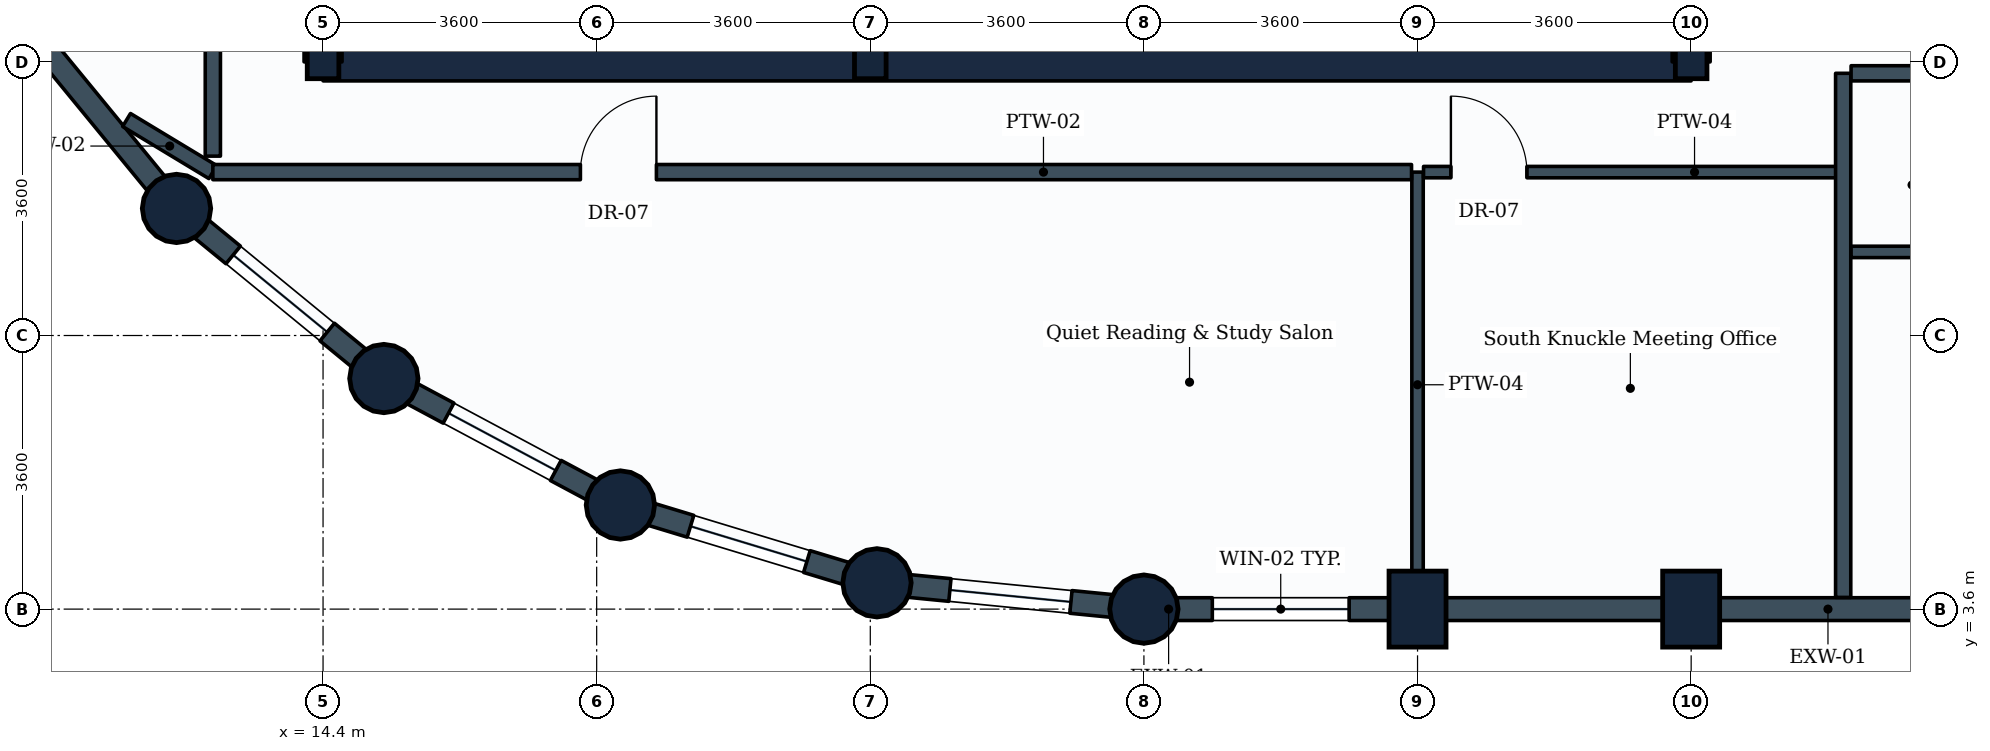
"""IFC4 building model, lengths in metres.
Left out: names, types, materials, properties, quantities, classifications, styles, units other than length and angle.
Written with IfcOpenShell. Run it as: python <this file> out.ifc"""

import sys

from ifc_helpers import new_model, si_unit, direction, frame, frame_2d, origin, origin_2d, place, context, subcontext, project, spatial, rectangle, circle, i_section, extrude, element, fill, save


model = new_model("IFC4")
c1 = context("Model", 3, precision=1e-05, world=origin(), true_north=direction((0.0, 1.0)))
c2 = subcontext(c1, "Body", "Model", "MODEL_VIEW")
j1 = project(units=[si_unit("LENGTHUNIT", "METRE"), si_unit("PLANEANGLEUNIT", "RADIAN")], contexts=[c1])
p1 = place(None, origin())
s1 = spatial("IfcSite", under=j1, at=p1, CompositionType="ELEMENT")
p2 = place(p1, origin())
s2 = spatial("IfcBuilding", under=s1, at=p2, CompositionType="ELEMENT")
p3 = place(p2, frame((0.0, 0.0, 127.6)))
s3 = spatial("IfcBuildingStorey", under=s2, at=p3, CompositionType="ELEMENT", Elevation=127.6)
p4 = place(p3, frame((12.472, 8.872, 0.0), z_axis=(0.0, 0.0, 1.0), x_axis=(1.0, 0.0, 0.0)))
e1 = element("IfcColumn", 1, at=p4, inside=s3, PredefinedType="COLUMN", context=c2, shape_type="SweptSolid", body=[
    extrude(circle(Radius=0.45, at=origin_2d()), origin(), (0.0, 0.0, 1.0), 3.8),
])
p5 = place(p3, frame((14.4, 10.8, 0.0), z_axis=(0.0, 0.0, 1.0), x_axis=(1.0, 0.0, 0.0)))
e2 = element("IfcColumn", 2, at=p5, inside=s3, PredefinedType="COLUMN", context=c2, shape_type="SweptSolid", body=[
    extrude(i_section(OverallWidth=0.416, OverallDepth=0.442, WebThickness=0.025, FlangeThickness=0.041, FilletRadius=0.015, at=origin_2d()), origin(), (0.0, 0.0, 1.0), 3.8),
])
for number, where, z_axis, x_axis in (
    (3, (15.2, 6.634, 0.0), (0.0, 0.0, 1.0), (1.0, 0.0, 0.0)),
    (4, (18.312, 4.97, 0.0), (0.0, 0.0, 1.0), (1.0, 0.0, 0.0)),
):
    element("IfcColumn", number, at=place(p3, frame(where, z_axis=z_axis, x_axis=x_axis)), inside=s3, PredefinedType="COLUMN", context=c2, shape_type="SweptSolid", body=[
        extrude(circle(Radius=0.45, at=origin_2d()), origin(), (0.0, 0.0, 1.0), 3.8),
    ])
p6 = place(p3, frame((21.6, 10.8, 0.0), z_axis=(0.0, 0.0, 1.0), x_axis=(1.0, 0.0, 0.0)))
e5 = element("IfcColumn", 5, at=p6, inside=s3, PredefinedType="COLUMN", context=c2, shape_type="SweptSolid", body=[
    extrude(i_section(OverallWidth=0.416, OverallDepth=0.442, WebThickness=0.025, FlangeThickness=0.041, FilletRadius=0.015, at=origin_2d()), origin(), (0.0, 0.0, 1.0), 3.8),
])
for number, where, z_axis, x_axis in (
    (6, (21.688, 3.946, 0.0), (0.0, 0.0, 1.0), (1.0, 0.0, 0.0)),
    (7, (25.2, 3.6, 0.0), (0.0, 0.0, 1.0), (1.0, 0.0, 0.0)),
):
    element("IfcColumn", number, at=place(p3, frame(where, z_axis=z_axis, x_axis=x_axis)), inside=s3, PredefinedType="COLUMN", context=c2, shape_type="SweptSolid", body=[
        extrude(circle(Radius=0.45, at=origin_2d()), origin(), (0.0, 0.0, 1.0), 3.8),
    ])
for number, where, z_axis, x_axis in (
    (8, (28.8, 3.6, 0.0), (0.0, 0.0, 1.0), (1.0, 0.0, 0.0)),
    (9, (32.4, 3.6, 0.0), (0.0, 0.0, 1.0), (1.0, 0.0, 0.0)),
):
    element("IfcColumn", number, at=place(p3, frame(where, z_axis=z_axis, x_axis=x_axis)), inside=s3, PredefinedType="COLUMN", context=c2, shape_type="SweptSolid", body=[
        extrude(rectangle(XDim=0.75, YDim=1.0, at=origin_2d()), origin(), (0.0, 0.0, 1.0), 3.8),
    ])
p7 = place(p3, frame((32.4, 10.8, 0.0), z_axis=(0.0, 0.0, 1.0), x_axis=(1.0, 0.0, 0.0)))
e10 = element("IfcColumn", 10, at=p7, inside=s3, PredefinedType="COLUMN", context=c2, shape_type="SweptSolid", body=[
    extrude(i_section(OverallWidth=0.416, OverallDepth=0.442, WebThickness=0.025, FlangeThickness=0.041, FilletRadius=0.015, at=origin_2d()), origin(), (0.0, 0.0, 1.0), 3.8),
])
p8 = place(p3, frame((28.8, 3.6, 0.0), z_axis=(0.0, 0.0, 1.0), x_axis=(-1.0, 0.0, 0.0)))
e11 = element("IfcWall", 11, at=p8, inside=s3, PredefinedType="STANDARD", context=c2, shape_type="SweptSolid", body=[
    extrude(rectangle(XDim=3.6, YDim=0.3, at=frame_2d((1.8, 0.0))), origin(), (0.0, 0.0, 1.0), 2.93),
])
p9 = place(p8, frame((0.9, 0.0, 0.85)))
e12 = element("IfcOpeningElement", 12, at=p9, cuts=e11, PredefinedType="OPENING", context=c2, shape_type="SweptSolid", body=[
    extrude(rectangle(XDim=1.8, YDim=1.35, at=frame_2d((0.9, 0.675))), frame((0.0, 0.16, 0.0), z_axis=(0.0, -1.0, 0.0), x_axis=(1.0, 0.0, 0.0)), (0.0, 0.0, 1.0), 0.32),
])
p10 = place(p3, frame((32.4, 3.6, 0.0), z_axis=(0.0, 0.0, 1.0), x_axis=(-1.0, 0.0, 0.0)))
e13 = element("IfcWall", 13, at=p10, inside=s3, PredefinedType="STANDARD", context=c2, shape_type="SweptSolid", body=[
    extrude(rectangle(XDim=3.6, YDim=0.3, at=frame_2d((1.8, 0.0))), origin(), (0.0, 0.0, 1.0), 2.93),
])
p11 = place(p3, frame((36.0, 3.6, 0.0), z_axis=(0.0, 0.0, 1.0), x_axis=(-1.0, 0.0, 0.0)))
e14 = element("IfcWall", 14, at=p11, inside=s3, PredefinedType="STANDARD", context=c2, shape_type="SweptSolid", body=[
    extrude(rectangle(XDim=3.6, YDim=0.3, at=frame_2d((1.8, 0.0))), origin(), (0.0, 0.0, 1.0), 2.93),
])
p12 = place(p3, frame((12.472, 8.872, 0.0), z_axis=(0.0, 0.0, 1.0), x_axis=(-0.634258295121, 0.773121216285, 0.0)))
e15 = element("IfcWall", 15, at=p12, inside=s3, PredefinedType="STANDARD", context=c2, shape_type="SweptSolid", body=[
    extrude(rectangle(XDim=3.529, YDim=0.3, at=frame_2d((1.764, 0.0))), origin(), (0.0, 0.0, 1.0), 2.93),
])
p13 = place(p3, frame((15.2, 6.634, 0.0), z_axis=(0.0, 0.0, 1.0), x_axis=(-0.773121216285, 0.634258295121, 0.0)))
e16 = element("IfcWall", 16, at=p13, inside=s3, PredefinedType="STANDARD", context=c2, shape_type="SweptSolid", body=[
    extrude(rectangle(XDim=3.529, YDim=0.3, at=frame_2d((1.764, 0.0))), origin(), (0.0, 0.0, 1.0), 2.93),
])
p14 = place(p13, frame((0.964, 0.0, 0.85)))
e17 = element("IfcOpeningElement", 17, at=p14, cuts=e16, PredefinedType="OPENING", context=c2, shape_type="SweptSolid", body=[
    extrude(rectangle(XDim=1.6, YDim=1.35, at=frame_2d((0.8, 0.675))), frame((0.0, 0.16, 0.0), z_axis=(0.0, -1.0, 0.0), x_axis=(1.0, 0.0, 0.0)), (0.0, 0.0, 1.0), 0.32),
])
p15 = place(p3, frame((18.312, 4.97, 0.0), z_axis=(0.0, 0.0, 1.0), x_axis=(-0.881846862014, 0.471535907389, 0.0)))
e18 = element("IfcWall", 18, at=p15, inside=s3, PredefinedType="STANDARD", context=c2, shape_type="SweptSolid", body=[
    extrude(rectangle(XDim=3.529, YDim=0.3, at=frame_2d((1.765, 0.0))), origin(), (0.0, 0.0, 1.0), 2.93),
])
p16 = place(p15, frame((0.964, 0.0, 0.85)))
e19 = element("IfcOpeningElement", 19, at=p16, cuts=e18, PredefinedType="OPENING", context=c2, shape_type="SweptSolid", body=[
    extrude(rectangle(XDim=1.6, YDim=1.35, at=frame_2d((0.8, 0.675))), frame((0.0, 0.16, 0.0), z_axis=(0.0, -1.0, 0.0), x_axis=(1.0, 0.0, 0.0)), (0.0, 0.0, 1.0), 0.32),
])
p17 = place(p3, frame((21.688, 3.946, 0.0), z_axis=(0.0, 0.0, 1.0), x_axis=(-0.956953367403, 0.290241714123, 0.0)))
e20 = element("IfcWall", 20, at=p17, inside=s3, PredefinedType="STANDARD", context=c2, shape_type="SweptSolid", body=[
    extrude(rectangle(XDim=3.528, YDim=0.3, at=frame_2d((1.764, 0.0))), origin(), (0.0, 0.0, 1.0), 2.93),
])
p18 = place(p17, frame((0.964, 0.0, 0.85)))
e21 = element("IfcOpeningElement", 21, at=p18, cuts=e20, PredefinedType="OPENING", context=c2, shape_type="SweptSolid", body=[
    extrude(rectangle(XDim=1.6, YDim=1.35, at=frame_2d((0.8, 0.675))), frame((0.0, 0.16, 0.0), z_axis=(0.0, -1.0, 0.0), x_axis=(1.0, 0.0, 0.0)), (0.0, 0.0, 1.0), 0.32),
])
p19 = place(p3, frame((25.2, 3.6, 0.0), z_axis=(0.0, 0.0, 1.0), x_axis=(-0.995183369056, 0.098030923459, 0.0)))
e22 = element("IfcWall", 22, at=p19, inside=s3, PredefinedType="STANDARD", context=c2, shape_type="SweptSolid", body=[
    extrude(rectangle(XDim=3.529, YDim=0.3, at=frame_2d((1.765, 0.0))), origin(), (0.0, 0.0, 1.0), 2.93),
])
p20 = place(p19, frame((0.965, 0.0, 0.85)))
e23 = element("IfcOpeningElement", 23, at=p20, cuts=e22, PredefinedType="OPENING", context=c2, shape_type="SweptSolid", body=[
    extrude(rectangle(XDim=1.6, YDim=1.35, at=frame_2d((0.8, 0.675))), frame((0.0, 0.16, 0.0), z_axis=(0.0, -1.0, 0.0), x_axis=(1.0, 0.0, 0.0)), (0.0, 0.0, 1.0), 0.32),
])
p21 = place(p3, frame((14.4, 10.8, 0.0), z_axis=(0.0, 0.0, 1.0), x_axis=(1.0, 0.0, 0.0)))
e24 = element("IfcWall", 24, at=p21, inside=s3, PredefinedType="SHEAR", context=c2, shape_type="SweptSolid", body=[
    extrude(rectangle(XDim=18.0, YDim=0.5, at=frame_2d((9.0, 0.0))), origin(), (0.0, 0.0, 1.0), 3.55),
])
p22 = place(p3, frame((14.4, 10.8, 0.0), z_axis=(0.0, 0.0, 1.0), x_axis=(0.0, 1.0, 0.0)))
e25 = element("IfcWall", 25, at=p22, inside=s3, PredefinedType="SHEAR", context=c2, shape_type="SweptSolid", body=[
    extrude(rectangle(XDim=14.4, YDim=0.5, at=frame_2d((7.2, 0.0))), origin(), (0.0, 0.0, 1.0), 3.55),
])
p23 = place(p22, frame((11.05, 0.0, 0.0)))
e26 = element("IfcOpeningElement", 26, at=p23, cuts=e25, PredefinedType="OPENING", context=c2, shape_type="SweptSolid", body=[
    extrude(rectangle(XDim=1.1, YDim=2.1, at=frame_2d((0.55, 1.05))), frame((0.0, 0.26, 0.0), z_axis=(0.0, -1.0, 0.0), x_axis=(1.0, 0.0, 0.0)), (0.0, 0.0, 1.0), 0.52),
])
p24 = place(p22, frame((4.9, 0.0, 0.0)))
e27 = element("IfcOpeningElement", 27, at=p24, cuts=e25, PredefinedType="OPENING", context=c2, shape_type="SweptSolid", body=[
    extrude(rectangle(XDim=1.2, YDim=2.1, at=frame_2d((0.6, 1.05))), frame((0.0, 0.26, 0.0), z_axis=(0.0, -1.0, 0.0), x_axis=(1.0, 0.0, 0.0)), (0.0, 0.0, 1.0), 0.52),
])
p25 = place(p3, frame((32.4, 10.8, 0.0), z_axis=(0.0, 0.0, 1.0), x_axis=(0.0, 1.0, 0.0)))
e28 = element("IfcWall", 28, at=p25, inside=s3, PredefinedType="SHEAR", context=c2, shape_type="SweptSolid", body=[
    extrude(rectangle(XDim=14.4, YDim=0.5, at=frame_2d((7.2, 0.0))), origin(), (0.0, 0.0, 1.0), 3.55),
])
p26 = place(p25, frame((4.35, 0.0, 0.0)))
e29 = element("IfcOpeningElement", 29, at=p26, cuts=e28, PredefinedType="OPENING", context=c2, shape_type="SweptSolid", body=[
    extrude(rectangle(XDim=1.2, YDim=2.1, at=frame_2d((0.6, 1.05))), frame((0.0, 0.26, 0.0), z_axis=(0.0, -1.0, 0.0), x_axis=(1.0, 0.0, 0.0)), (0.0, 0.0, 1.0), 0.52),
])
p27 = place(p25, frame((10.0, 0.0, 0.0)))
e30 = element("IfcOpeningElement", 30, at=p27, cuts=e28, PredefinedType="OPENING", context=c2, shape_type="SweptSolid", body=[
    extrude(rectangle(XDim=1.2, YDim=2.1, at=frame_2d((0.6, 1.05))), frame((0.0, 0.26, 0.0), z_axis=(0.0, -1.0, 0.0), x_axis=(1.0, 0.0, 0.0)), (0.0, 0.0, 1.0), 0.52),
])
p28 = place(p3, frame((28.8, 9.35, 0.0), z_axis=(0.0, 0.0, 1.0), x_axis=(0.0, -1.0, 0.0)))
e31 = element("IfcWall", 31, at=p28, inside=s3, PredefinedType="PARTITIONING", context=c2, shape_type="SweptSolid", body=[
    extrude(rectangle(XDim=5.596, YDim=0.15, at=frame_2d((2.798, 0.0))), origin(), (0.0, 0.0, 1.0), 3.535),
])
p29 = place(p3, frame((12.95, 9.35, 0.0), z_axis=(0.0, 0.0, 1.0), x_axis=(-0.856027557466, 0.516930189541, 0.0)))
e32 = element("IfcWall", 32, at=p29, inside=s3, PredefinedType="PARTITIONING", context=c2, shape_type="SweptSolid", body=[
    extrude(rectangle(XDim=1.326, YDim=0.2, at=frame_2d((0.663, 0.0))), origin(), (0.0, 0.0, 1.0), 2.93),
])
p30 = place(p3, frame((12.95, 9.56, 0.0), z_axis=(0.0, 0.0, 1.0), x_axis=(0.0, 1.0, 0.0)))
e33 = element("IfcWall", 33, at=p30, inside=s3, PredefinedType="PARTITIONING", context=c2, shape_type="SweptSolid", body=[
    extrude(rectangle(XDim=15.561, YDim=0.2, at=frame_2d((7.78, 0.0))), origin(), (0.0, 0.0, 1.0), 3.17),
])
p31 = place(p30, frame((6.78, 0.0, 0.0)))
e34 = element("IfcOpeningElement", 34, at=p31, cuts=e33, PredefinedType="OPENING", context=c2, shape_type="SweptSolid", body=[
    extrude(rectangle(XDim=1.0, YDim=2.1, at=frame_2d((0.5, 1.05))), frame((0.0, 0.11, 0.0), z_axis=(0.0, -1.0, 0.0), x_axis=(1.0, 0.0, 0.0)), (0.0, 0.0, 1.0), 0.22),
])
p32 = place(p3, frame((12.95, 9.35, 0.0), z_axis=(0.0, 0.0, 1.0), x_axis=(1.0, 0.0, 0.0)))
e35 = element("IfcWall", 35, at=p32, inside=s3, PredefinedType="PARTITIONING", context=c2, shape_type="SweptSolid", body=[
    extrude(rectangle(XDim=15.771, YDim=0.2, at=frame_2d((7.885, 0.0))), origin(), (0.0, 0.0, 1.0), 3.17),
])
p33 = place(p32, frame((4.836, 0.0, 0.0)))
e36 = element("IfcOpeningElement", 36, at=p33, cuts=e35, PredefinedType="OPENING", context=c2, shape_type="SweptSolid", body=[
    extrude(rectangle(XDim=1.0, YDim=2.1, at=frame_2d((0.5, 1.05))), frame((0.0, 0.11, 0.0), z_axis=(0.0, -1.0, 0.0), x_axis=(1.0, 0.0, 0.0)), (0.0, 0.0, 1.0), 0.22),
])
p34 = place(p3, frame((28.879, 9.35, 0.0), z_axis=(0.0, 0.0, 1.0), x_axis=(1.0, 0.0, 0.0)))
e37 = element("IfcWall", 37, at=p34, inside=s3, PredefinedType="PARTITIONING", context=c2, shape_type="SweptSolid", body=[
    extrude(rectangle(XDim=5.521, YDim=0.15, at=frame_2d((2.76, 0.0))), origin(), (0.0, 0.0, 1.0), 3.535),
])
p35 = place(p34, frame((0.36, 0.0, 0.0)))
e38 = element("IfcOpeningElement", 38, at=p35, cuts=e37, PredefinedType="OPENING", context=c2, shape_type="SweptSolid", body=[
    extrude(rectangle(XDim=1.0, YDim=2.1, at=frame_2d((0.5, 1.05))), frame((0.0, 0.085, 0.0), z_axis=(0.0, -1.0, 0.0), x_axis=(1.0, 0.0, 0.0)), (0.0, 0.0, 1.0), 0.17),
])
p36 = place(p3, frame((34.4, 3.754, 0.0), z_axis=(0.0, 0.0, 1.0), x_axis=(0.0, 1.0, 0.0)))
e39 = element("IfcWall", 39, at=p36, inside=s3, PredefinedType="PARTITIONING", context=c2, shape_type="SweptSolid", body=[
    extrude(rectangle(XDim=6.896, YDim=0.2, at=frame_2d((3.448, 0.0))), origin(), (0.0, 0.0, 1.0), 2.93),
])
p37 = place(p3, frame((34.504, 10.65, 0.0), z_axis=(0.0, 0.0, 1.0), x_axis=(1.0, 0.0, 0.0)))
e40 = element("IfcWall", 40, at=p37, inside=s3, PredefinedType="PARTITIONING", context=c2, shape_type="SweptSolid", body=[
    extrude(rectangle(XDim=2.296, YDim=0.2, at=frame_2d((1.148, 0.0))), origin(), (0.0, 0.0, 1.0), 3.08),
])
p38 = place(p3, frame((34.504, 8.3, 0.0), z_axis=(0.0, 0.0, 1.0), x_axis=(1.0, 0.0, 0.0)))
e41 = element("IfcWall", 41, at=p38, inside=s3, PredefinedType="PARTITIONING", context=c2, shape_type="SweptSolid", body=[
    extrude(rectangle(XDim=2.217, YDim=0.15, at=frame_2d((1.108, 0.0))), origin(), (0.0, 0.0, 1.0), 3.22),
])
p39 = place(p9, origin())
e42 = element("IfcWindow", 42, at=p39, inside=s3, PartitioningType="SINGLE_PANEL", PredefinedType="WINDOW", context=c2, shape_type="SweptSolid", body=[
    extrude(rectangle(XDim=1.8, YDim=1.35, at=frame_2d((0.9, 0.675))), frame((0.0, 0.03, 0.0), z_axis=(0.0, -1.0, 0.0), x_axis=(1.0, 0.0, 0.0)), (0.0, 0.0, 1.0), 0.06),
])
fill(e12, e42)
p40 = place(p14, origin())
e43 = element("IfcWindow", 43, at=p40, inside=s3, PartitioningType="SINGLE_PANEL", PredefinedType="WINDOW", context=c2, shape_type="SweptSolid", body=[
    extrude(rectangle(XDim=1.6, YDim=1.35, at=frame_2d((0.8, 0.675))), frame((0.0, 0.03, 0.0), z_axis=(0.0, -1.0, 0.0), x_axis=(1.0, 0.0, 0.0)), (0.0, 0.0, 1.0), 0.06),
])
fill(e17, e43)
p41 = place(p16, origin())
e44 = element("IfcWindow", 44, at=p41, inside=s3, PartitioningType="SINGLE_PANEL", PredefinedType="WINDOW", context=c2, shape_type="SweptSolid", body=[
    extrude(rectangle(XDim=1.6, YDim=1.35, at=frame_2d((0.8, 0.675))), frame((0.0, 0.03, 0.0), z_axis=(0.0, -1.0, 0.0), x_axis=(1.0, 0.0, 0.0)), (0.0, 0.0, 1.0), 0.06),
])
fill(e19, e44)
p42 = place(p18, origin())
e45 = element("IfcWindow", 45, at=p42, inside=s3, PartitioningType="SINGLE_PANEL", PredefinedType="WINDOW", context=c2, shape_type="SweptSolid", body=[
    extrude(rectangle(XDim=1.6, YDim=1.35, at=frame_2d((0.8, 0.675))), frame((0.0, 0.03, 0.0), z_axis=(0.0, -1.0, 0.0), x_axis=(1.0, 0.0, 0.0)), (0.0, 0.0, 1.0), 0.06),
])
fill(e21, e45)
p43 = place(p20, origin())
e46 = element("IfcWindow", 46, at=p43, inside=s3, PartitioningType="SINGLE_PANEL", PredefinedType="WINDOW", context=c2, shape_type="SweptSolid", body=[
    extrude(rectangle(XDim=1.6, YDim=1.35, at=frame_2d((0.8, 0.675))), frame((0.0, 0.03, 0.0), z_axis=(0.0, -1.0, 0.0), x_axis=(1.0, 0.0, 0.0)), (0.0, 0.0, 1.0), 0.06),
])
fill(e23, e46)
p44 = place(p33, origin())
e47 = element("IfcDoor", 47, at=p44, inside=s3, OperationType="SINGLE_SWING_RIGHT", PredefinedType="DOOR", context=c2, shape_type="SweptSolid", body=[
    extrude(rectangle(XDim=1.0, YDim=2.1, at=frame_2d((0.5, 1.05))), frame((0.0, 0.025, 0.0), z_axis=(0.0, -1.0, 0.0), x_axis=(1.0, 0.0, 0.0)), (0.0, 0.0, 1.0), 0.05),
])
fill(e36, e47)
p45 = place(p35, origin())
e48 = element("IfcDoor", 48, at=p45, inside=s3, OperationType="SINGLE_SWING_LEFT", PredefinedType="DOOR", context=c2, shape_type="SweptSolid", body=[
    extrude(rectangle(XDim=1.0, YDim=2.1, at=frame_2d((0.5, 1.05))), frame((0.0, 0.025, 0.0), z_axis=(0.0, -1.0, 0.0), x_axis=(1.0, 0.0, 0.0)), (0.0, 0.0, 1.0), 0.05),
])
fill(e38, e48)
save(model, sys.argv[1])
